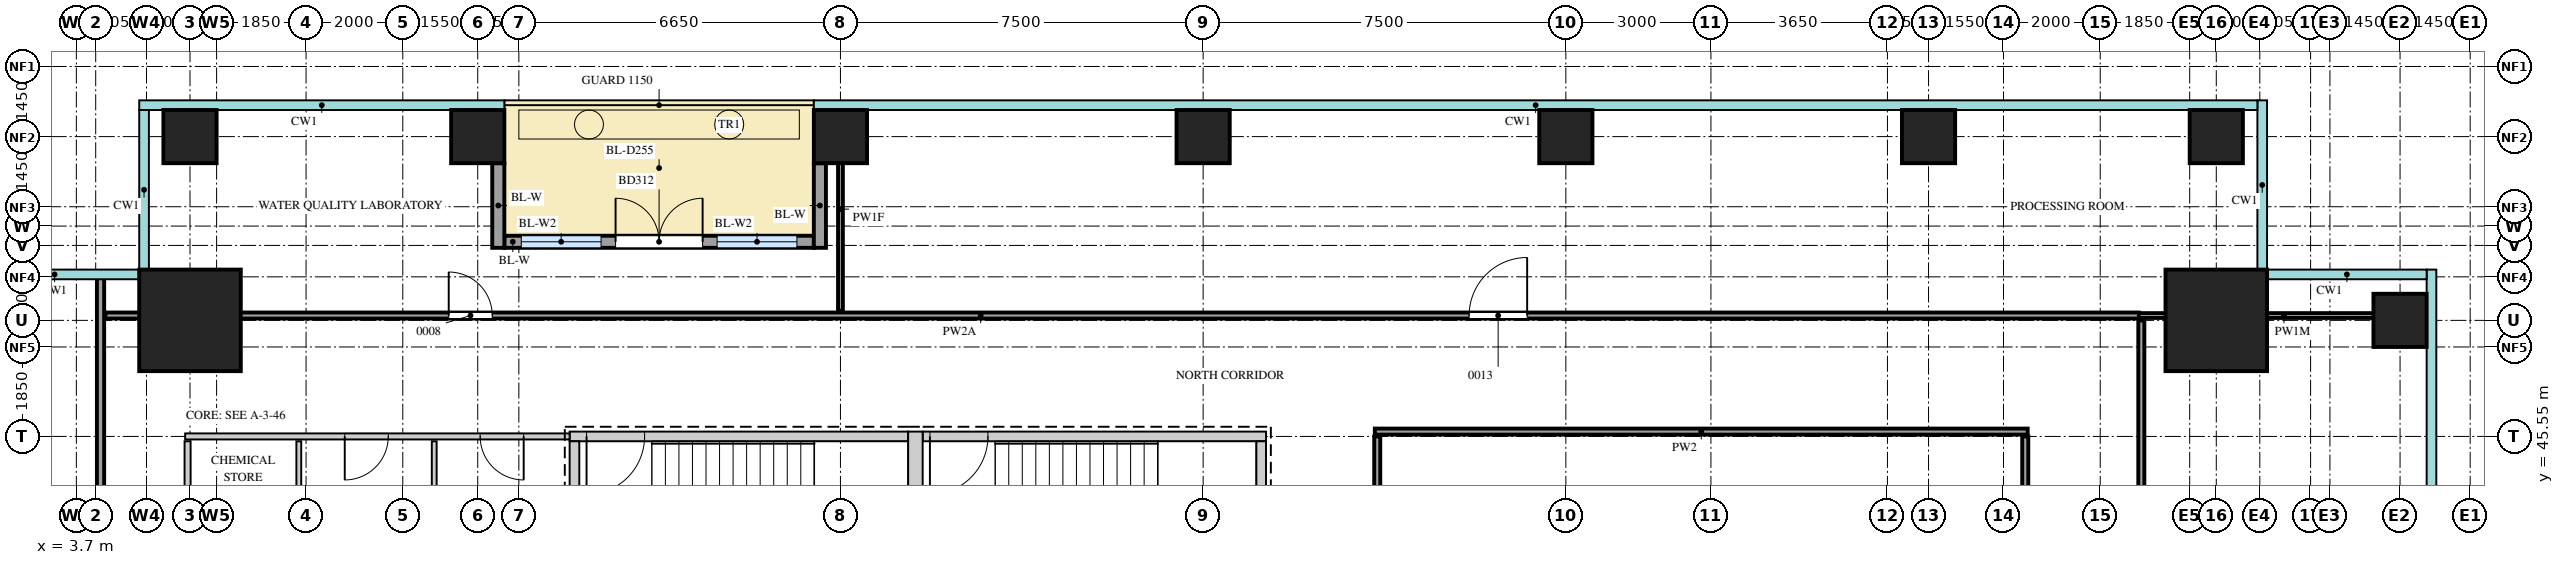
"""IFC4 building model, lengths in metres.
Left out: names, types, materials, properties, quantities, classifications, styles, units other than length and angle.
Written with IfcOpenShell. Run it as: python <this file> out.ifc"""

import sys

from ifc_helpers import new_model, si_unit, direction, frame, frame_2d, origin, origin_2d, place, context, subcontext, project, spatial, rectangle, extrude, source, transform, mapped, element, fill, save


model = new_model("IFC4")
c1 = context("Model", 3, precision=1e-05, world=origin(), true_north=direction((0.0, 1.0)))
c2 = subcontext(c1, "Body", "Model", "MODEL_VIEW")
j1 = project(units=[si_unit("LENGTHUNIT", "METRE"), si_unit("PLANEANGLEUNIT", "RADIAN")], contexts=[c1])
p1 = place(None, origin())
s1 = spatial("IfcSite", under=j1, at=p1, CompositionType="ELEMENT")
p2 = place(p1, origin())
s2 = spatial("IfcBuilding", under=s1, at=p2, CompositionType="ELEMENT")
p3 = place(p2, frame((0.0, 0.0, 145.5)))
s3 = spatial("IfcBuildingStorey", under=s2, at=p3, CompositionType="ELEMENT", Elevation=145.5)
m1 = source(origin(), c2, "Body", "SweptSolid", [
    extrude(rectangle(XDim=7.0, YDim=0.2, at=frame_2d((3.5, 0.0))), origin(), (0.0, 0.0, 1.0), 4.1),
])
p4 = place(p3, frame((13.9, 45.55, 0.0), z_axis=(0.0, 0.0, 1.0), x_axis=(1.0, 0.0, 0.0)))
e1 = element("IfcWall", 1, at=p4, inside=s3, PredefinedType="SHEAR", context=c2, shape_type="MappedRepresentation", body=[
    mapped(m1, transform((0.0, 0.0, 0.0))),
])
m2 = source(origin(), c2, "Body", "SweptSolid", [
    extrude(rectangle(XDim=1.2, YDim=2.1, at=frame_2d((0.6, 1.05))), frame((0.0, 0.11, 0.0), z_axis=(0.0, -1.0, 0.0), x_axis=(1.0, 0.0, 0.0)), (0.0, 0.0, 1.0), 0.22),
])
p5 = place(p4, frame((0.35, 0.0, 0.0)))
e2 = element("IfcOpeningElement", 2, at=p5, cuts=e1, PredefinedType="OPENING", context=c2, shape_type="MappedRepresentation", body=[
    mapped(m2, transform((0.0, 0.0, 0.0))),
])
m3 = source(origin(), c2, "Body", "SweptSolid", [
    extrude(rectangle(XDim=7.1, YDim=0.2, at=frame_2d((3.55, 0.0))), origin(), (0.0, 0.0, 1.0), 4.1),
])
p6 = place(p3, frame((21.2, 45.55, 0.0), z_axis=(0.0, 0.0, 1.0), x_axis=(1.0, 0.0, 0.0)))
e3 = element("IfcWall", 3, at=p6, inside=s3, PredefinedType="SHEAR", context=c2, shape_type="MappedRepresentation", body=[
    mapped(m3, transform((0.0, 0.0, 0.0))),
])
p7 = place(p6, frame((0.15, 0.0, 0.0)))
e4 = element("IfcOpeningElement", 4, at=p7, cuts=e3, PredefinedType="OPENING", context=c2, shape_type="MappedRepresentation", body=[
    mapped(m2, transform((0.0, 0.0, 0.0))),
])
m4 = source(origin(), c2, "Body", "SweptSolid", [
    extrude(rectangle(XDim=3.75, YDim=0.3, at=frame_2d((1.875, 0.0))), origin(), (0.0, 0.0, 1.0), 4.1),
])
p8 = place(p3, frame((21.05, 41.9, 0.0), z_axis=(0.0, 0.0, 1.0), x_axis=(0.0, 1.0, 0.0)))
e5 = element("IfcWall", 5, at=p8, inside=s3, PredefinedType="SHEAR", context=c2, shape_type="MappedRepresentation", body=[
    mapped(m4, transform((0.0, 0.0, 0.0))),
])
m5 = source(origin(), c2, "Body", "SweptSolid", [
    extrude(rectangle(XDim=3.35, YDim=0.2, at=frame_2d((1.675, 0.0))), origin(), (0.0, 0.0, 1.0), 4.1),
])
for number, where, z_axis, x_axis in (
    (6, (14.0, 42.1, 0.0), (0.0, 0.0, 1.0), (0.0, 1.0, 0.0)),
    (7, (28.2, 42.1, 0.0), (0.0, 0.0, 1.0), (0.0, 1.0, 0.0)),
):
    element("IfcWall", number, at=place(p3, frame(where, z_axis=z_axis, x_axis=x_axis)), inside=s3, PredefinedType="SHEAR", context=c2, shape_type="MappedRepresentation", body=[
        mapped(m5, transform((0.0, 0.0, 0.0))),
    ])
m6 = source(origin(), c2, "Body", "SweptSolid", [
    extrude(rectangle(XDim=2.1, YDim=2.1, at=origin_2d()), origin(), (0.0, 0.0, 1.0), 4.4),
])
for number, where, z_axis, x_axis in (
    (8, (47.95, 47.95, 0.0), (0.0, 0.0, 1.0), (1.0, 0.0, 0.0)),
    (9, (6.05, 47.95, 0.0), (0.0, 0.0, 1.0), (1.0, 0.0, 0.0)),
):
    element("IfcColumn", number, at=place(p3, frame(where, z_axis=z_axis, x_axis=x_axis)), inside=s3, PredefinedType="COLUMN", context=c2, shape_type="MappedRepresentation", body=[
        mapped(m6, transform((0.0, 0.0, 0.0))),
    ])
m7 = source(origin(), c2, "Body", "SweptSolid", [
    extrude(rectangle(XDim=1.1, YDim=1.1, at=origin_2d()), origin(), (0.0, 0.0, 1.0), 4.1),
])
for number, where, z_axis, x_axis in (
    (10, (51.75, 47.95, 0.0), (0.0, 0.0, 1.0), (1.0, 0.0, 0.0)),
    (11, (6.05, 51.75, 0.0), (0.0, 0.0, 1.0), (1.0, 0.0, 0.0)),
    (12, (12.0, 51.75, 0.0), (0.0, 0.0, 1.0), (1.0, 0.0, 0.0)),
    (13, (19.5, 51.75, 0.0), (0.0, 0.0, 1.0), (1.0, 0.0, 0.0)),
    (14, (27.0, 51.75, 0.0), (0.0, 0.0, 1.0), (1.0, 0.0, 0.0)),
    (15, (34.5, 51.75, 0.0), (0.0, 0.0, 1.0), (1.0, 0.0, 0.0)),
    (16, (42.0, 51.75, 0.0), (0.0, 0.0, 1.0), (1.0, 0.0, 0.0)),
    (17, (47.95, 51.75, 0.0), (0.0, 0.0, 1.0), (1.0, 0.0, 0.0)),
):
    element("IfcColumn", number, at=place(p3, frame(where, z_axis=z_axis, x_axis=x_axis)), inside=s3, PredefinedType="COLUMN", context=c2, shape_type="MappedRepresentation", body=[
        mapped(m7, transform((0.0, 0.0, 0.0))),
    ])
m8 = source(origin(), c2, "Body", "SweptSolid", [
    extrude(rectangle(XDim=6.4, YDim=0.25, at=frame_2d((3.2, 0.0))), origin(), (0.0, 0.0, 1.0), 4.1),
])
p9 = place(p3, frame((12.55, 49.575, 0.0), z_axis=(0.0, 0.0, 1.0), x_axis=(1.0, 0.0, 0.0)))
e18 = element("IfcWall", 18, at=p9, inside=s3, PredefinedType="SOLIDWALL", context=c2, shape_type="MappedRepresentation", body=[
    mapped(m8, transform((0.0, 0.0, 0.0))),
])
m9 = source(origin(), c2, "Body", "SweptSolid", [
    extrude(rectangle(XDim=1.65, YDim=2.4, at=frame_2d((0.825, 1.2))), frame((0.0, 0.135, 0.0), z_axis=(0.0, -1.0, 0.0), x_axis=(1.0, 0.0, 0.0)), (0.0, 0.0, 1.0), 0.27),
])
p10 = place(p9, frame((0.35, 0.0, 0.0)))
e19 = element("IfcOpeningElement", 19, at=p10, cuts=e18, PredefinedType="OPENING", context=c2, shape_type="MappedRepresentation", body=[
    mapped(m9, transform((0.0, 0.0, 0.0))),
])
p11 = place(p9, frame((4.4, 0.0, 0.0)))
e20 = element("IfcOpeningElement", 20, at=p11, cuts=e18, PredefinedType="OPENING", context=c2, shape_type="MappedRepresentation", body=[
    mapped(m9, transform((0.0, 0.0, 0.0))),
])
m10 = source(origin(), c2, "Body", "SweptSolid", [
    extrude(rectangle(XDim=1.8, YDim=2.4, at=frame_2d((0.9, 1.2))), frame((0.0, 0.135, 0.0), z_axis=(0.0, -1.0, 0.0), x_axis=(1.0, 0.0, 0.0)), (0.0, 0.0, 1.0), 0.27),
])
p12 = place(p9, frame((2.3, 0.0, 0.0)))
e21 = element("IfcOpeningElement", 21, at=p12, cuts=e18, PredefinedType="OPENING", context=c2, shape_type="MappedRepresentation", body=[
    mapped(m10, transform((0.0, 0.0, 0.0))),
])
m11 = source(origin(), c2, "Body", "SweptSolid", [
    extrude(rectangle(XDim=1.75, YDim=0.25, at=frame_2d((0.875, 0.0))), origin(), (0.0, 0.0, 1.0), 4.1),
])
for number, where, z_axis, x_axis in (
    (22, (12.425, 51.2, 0.0), (0.0, 0.0, 1.0), (0.0, -1.0, 0.0)),
    (23, (19.075, 51.2, 0.0), (0.0, 0.0, 1.0), (0.0, -1.0, 0.0)),
):
    element("IfcWall", number, at=place(p3, frame(where, z_axis=z_axis, x_axis=x_axis)), inside=s3, PredefinedType="SOLIDWALL", context=c2, shape_type="MappedRepresentation", body=[
        mapped(m11, transform((0.0, 0.0, 0.0))),
    ])
m12 = source(origin(), c2, "Body", "SweptSolid", [
    extrude(rectangle(XDim=43.7, YDim=0.15, at=frame_2d((21.85, 0.0))), origin(), (0.0, 0.0, 1.0), 4.2),
])
p13 = place(p3, frame((4.2, 5.15, 0.0), z_axis=(0.0, 0.0, 1.0), x_axis=(0.0, 1.0, 0.0)))
e24 = element("IfcWall", 24, at=p13, inside=s3, PredefinedType="PARTITIONING", context=c2, shape_type="MappedRepresentation", body=[
    mapped(m12, transform((0.0, 0.0, 0.0))),
])
m13 = source(origin(), c2, "Body", "SweptSolid", [
    extrude(rectangle(XDim=0.9, YDim=2.1, at=frame_2d((0.45, 1.05))), frame((0.0, 0.085, 0.0), z_axis=(0.0, -1.0, 0.0), x_axis=(1.0, 0.0, 0.0)), (0.0, 0.0, 1.0), 0.17),
])
p14 = place(p13, frame((20.1, 0.0, 0.0)))
e25 = element("IfcOpeningElement", 25, at=p14, cuts=e24, PredefinedType="OPENING", context=c2, shape_type="MappedRepresentation", body=[
    mapped(m13, transform((0.0, 0.0, 0.0))),
])
m14 = source(origin(), c2, "Body", "SweptSolid", [
    extrude(rectangle(XDim=32.85, YDim=0.125, at=frame_2d((16.425, 0.0))), origin(), (0.0, 0.0, 1.0), 4.2),
])
p15 = place(p3, frame((44.0, 12.7, 0.0), z_axis=(0.0, 0.0, 1.0), x_axis=(0.0, 1.0, 0.0)))
e26 = element("IfcWall", 26, at=p15, inside=s3, PredefinedType="PARTITIONING", context=c2, shape_type="MappedRepresentation", body=[
    mapped(m14, transform((0.0, 0.0, 0.0))),
])
m15 = source(origin(), c2, "Body", "SweptSolid", [
    extrude(rectangle(XDim=1.2, YDim=2.1, at=frame_2d((0.6, 1.05))), frame((0.0, 0.073, 0.0), z_axis=(0.0, -1.0, 0.0), x_axis=(1.0, 0.0, 0.0)), (0.0, 0.0, 1.0), 0.145),
])
p16 = place(p15, frame((13.7, 0.0, 0.0)))
e27 = element("IfcOpeningElement", 27, at=p16, cuts=e26, PredefinedType="OPENING", context=c2, shape_type="MappedRepresentation", body=[
    mapped(m15, transform((0.0, 0.0, 0.0))),
])
p17 = place(p15, frame((27.5, 0.0, 0.0)))
e28 = element("IfcOpeningElement", 28, at=p17, cuts=e26, PredefinedType="OPENING", context=c2, shape_type="MappedRepresentation", body=[
    mapped(m15, transform((0.0, 0.0, 0.0))),
])
m16 = source(origin(), c2, "Body", "SweptSolid", [
    extrude(rectangle(XDim=13.35, YDim=0.125, at=frame_2d((6.675, 0.0))), origin(), (0.0, 0.0, 1.0), 4.2),
])
p18 = place(p3, frame((46.4, 34.6, 0.0), z_axis=(0.0, 0.0, 1.0), x_axis=(0.0, 1.0, 0.0)))
e29 = element("IfcWall", 29, at=p18, inside=s3, PredefinedType="PARTITIONING", context=c2, shape_type="MappedRepresentation", body=[
    mapped(m16, transform((0.0, 0.0, 0.0))),
])
p19 = place(p18, frame((4.9, 0.0, 0.0)))
e30 = element("IfcOpeningElement", 30, at=p19, cuts=e29, PredefinedType="OPENING", context=c2, shape_type="MappedRepresentation", body=[
    mapped(m15, transform((0.0, 0.0, 0.0))),
])
m17 = source(origin(), c2, "Body", "SweptSolid", [
    extrude(rectangle(XDim=9.45, YDim=0.125, at=frame_2d((4.725, 0.0))), origin(), (0.0, 0.0, 1.0), 4.2),
])
p20 = place(p3, frame((30.6, 36.1, 0.0), z_axis=(0.0, 0.0, 1.0), x_axis=(0.0, 1.0, 0.0)))
e31 = element("IfcWall", 31, at=p20, inside=s3, PredefinedType="PARTITIONING", context=c2, shape_type="MappedRepresentation", body=[
    mapped(m17, transform((0.0, 0.0, 0.0))),
])
m18 = source(origin(), c2, "Body", "SweptSolid", [
    extrude(rectangle(XDim=3.45, YDim=0.125, at=frame_2d((1.725, 0.0))), origin(), (0.0, 0.0, 1.0), 4.2),
])
p21 = place(p3, frame((6.0, 42.0, 0.0), z_axis=(0.0, 0.0, 1.0), x_axis=(0.0, 1.0, 0.0)))
e32 = element("IfcWall", 32, at=p21, inside=s3, PredefinedType="PARTITIONING", context=c2, shape_type="MappedRepresentation", body=[
    mapped(m18, transform((0.0, 0.0, 0.0))),
])
m19 = source(origin(), c2, "Body", "SweptSolid", [
    extrude(rectangle(XDim=0.9, YDim=2.1, at=frame_2d((0.45, 1.05))), frame((0.0, 0.073, 0.0), z_axis=(0.0, -1.0, 0.0), x_axis=(1.0, 0.0, 0.0)), (0.0, 0.0, 1.0), 0.145),
])
p22 = place(p21, frame((1.2, 0.0, 0.0)))
e33 = element("IfcOpeningElement", 33, at=p22, cuts=e32, PredefinedType="OPENING", context=c2, shape_type="MappedRepresentation", body=[
    mapped(m19, transform((0.0, 0.0, 0.0))),
])
m20 = source(origin(), c2, "Body", "SweptSolid", [
    extrude(rectangle(XDim=3.45, YDim=0.1, at=frame_2d((1.725, 0.0))), origin(), (0.0, 0.0, 1.0), 4.2),
])
for number, where, z_axis, x_axis in (
    (34, (8.3, 42.0, 0.0), (0.0, 0.0, 1.0), (0.0, 1.0, 0.0)),
    (35, (11.1, 42.0, 0.0), (0.0, 0.0, 1.0), (0.0, 1.0, 0.0)),
):
    element("IfcWall", number, at=place(p3, frame(where, z_axis=z_axis, x_axis=x_axis)), inside=s3, PredefinedType="PARTITIONING", context=c2, shape_type="MappedRepresentation", body=[
        mapped(m20, transform((0.0, 0.0, 0.0))),
    ])
m21 = source(origin(), c2, "Body", "SweptSolid", [
    extrude(rectangle(XDim=7.95, YDim=0.125, at=frame_2d((3.975, 0.0))), origin(), (0.0, 0.0, 1.0), 4.2),
])
p23 = place(p3, frame((5.95, 45.55, 0.0), z_axis=(0.0, 0.0, 1.0), x_axis=(1.0, 0.0, 0.0)))
e36 = element("IfcWall", 36, at=p23, inside=s3, PredefinedType="PARTITIONING", context=c2, shape_type="MappedRepresentation", body=[
    mapped(m21, transform((0.0, 0.0, 0.0))),
])
p24 = place(p23, frame((3.3, 0.0, 0.0)))
e37 = element("IfcOpeningElement", 37, at=p24, cuts=e36, PredefinedType="OPENING", context=c2, shape_type="MappedRepresentation", body=[
    mapped(m19, transform((0.0, 0.0, 0.0))),
])
p25 = place(p23, frame((6.1, 0.0, 0.0)))
e38 = element("IfcOpeningElement", 38, at=p25, cuts=e36, PredefinedType="OPENING", context=c2, shape_type="MappedRepresentation", body=[
    mapped(m19, transform((0.0, 0.0, 0.0))),
])
m22 = source(origin(), c2, "Body", "SweptSolid", [
    extrude(rectangle(XDim=13.5, YDim=0.125, at=frame_2d((6.75, 0.0))), origin(), (0.0, 0.0, 1.0), 4.2),
])
p26 = place(p3, frame((30.55, 45.65, 0.0), z_axis=(0.0, 0.0, 1.0), x_axis=(1.0, 0.0, 0.0)))
e39 = element("IfcWall", 39, at=p26, inside=s3, PredefinedType="PARTITIONING", context=c2, shape_type="MappedRepresentation", body=[
    mapped(m22, transform((0.0, 0.0, 0.0))),
])
m23 = source(origin(), c2, "Body", "SweptSolid", [
    extrude(rectangle(XDim=42.05, YDim=0.125, at=frame_2d((21.025, 0.0))), origin(), (0.0, 0.0, 1.0), 3.55),
])
p27 = place(p3, frame((4.3, 48.05, 0.0), z_axis=(0.0, 0.0, 1.0), x_axis=(1.0, 0.0, 0.0)))
e40 = element("IfcWall", 40, at=p27, inside=s3, PredefinedType="PARTITIONING", context=c2, shape_type="MappedRepresentation", body=[
    mapped(m23, transform((0.0, 0.0, 0.0))),
])
p28 = place(p27, frame((7.1, 0.0, 0.0)))
e41 = element("IfcOpeningElement", 41, at=p28, cuts=e40, PredefinedType="OPENING", context=c2, shape_type="MappedRepresentation", body=[
    mapped(m19, transform((0.0, 0.0, 0.0))),
])
p29 = place(p27, frame((28.2, 0.0, 0.0)))
e42 = element("IfcOpeningElement", 42, at=p29, cuts=e40, PredefinedType="OPENING", context=c2, shape_type="MappedRepresentation", body=[
    mapped(m15, transform((0.0, 0.0, 0.0))),
])
m24 = source(origin(), c2, "Body", "SweptSolid", [
    extrude(rectangle(XDim=6.0, YDim=0.1, at=frame_2d((3.0, 0.0))), origin(), (0.0, 0.0, 1.0), 3.55),
])
p30 = place(p3, frame((46.35, 48.05, 0.0), z_axis=(0.0, 0.0, 1.0), x_axis=(1.0, 0.0, 0.0)))
e43 = element("IfcWall", 43, at=p30, inside=s3, PredefinedType="PARTITIONING", context=c2, shape_type="MappedRepresentation", body=[
    mapped(m24, transform((0.0, 0.0, 0.0))),
])
m25 = source(origin(), c2, "Body", "SweptSolid", [
    extrude(rectangle(XDim=4.2, YDim=0.1, at=frame_2d((2.1, 0.0))), origin(), (0.0, 0.0, 1.0), 3.77),
])
p31 = place(p3, frame((19.5, 48.15, 0.0), z_axis=(0.0, 0.0, 1.0), x_axis=(0.0, 1.0, 0.0)))
e44 = element("IfcWall", 44, at=p31, inside=s3, PredefinedType="PARTITIONING", context=c2, shape_type="MappedRepresentation", body=[
    mapped(m25, transform((0.0, 0.0, 0.0))),
])
m26 = source(origin(), c2, "Body", "SweptSolid", [
    extrude(rectangle(XDim=1.65, YDim=2.4, at=frame_2d((0.825, 1.2))), frame((0.0, 0.03, 0.0), z_axis=(0.0, -1.0, 0.0), x_axis=(1.0, 0.0, 0.0)), (0.0, 0.0, 1.0), 0.06),
])
p32 = place(p10, origin())
e45 = element("IfcWindow", 45, at=p32, inside=s3, PartitioningType="SINGLE_PANEL", PredefinedType="WINDOW", context=c2, shape_type="MappedRepresentation", body=[
    mapped(m26, transform((0.0, 0.0, 0.0))),
])
fill(e19, e45)
p33 = place(p11, origin())
e46 = element("IfcWindow", 46, at=p33, inside=s3, PartitioningType="SINGLE_PANEL", PredefinedType="WINDOW", context=c2, shape_type="MappedRepresentation", body=[
    mapped(m26, transform((0.0, 0.0, 0.0))),
])
fill(e20, e46)
m27 = source(origin(), c2, "Body", "SweptSolid", [
    extrude(rectangle(XDim=1.8, YDim=2.4, at=frame_2d((0.9, 1.2))), frame((0.0, 0.025, 0.0), z_axis=(0.0, -1.0, 0.0), x_axis=(1.0, 0.0, 0.0)), (0.0, 0.0, 1.0), 0.05),
])
p34 = place(p12, origin())
e47 = element("IfcDoor", 47, at=p34, inside=s3, OperationType="DOUBLE_DOOR_DOUBLE_SWING", PredefinedType="DOOR", context=c2, shape_type="MappedRepresentation", body=[
    mapped(m27, transform((0.0, 0.0, 0.0))),
])
fill(e21, e47)
m28 = source(origin(), c2, "Body", "SweptSolid", [
    extrude(rectangle(XDim=0.9, YDim=2.1, at=frame_2d((0.45, 1.05))), frame((0.0, 0.025, 0.0), z_axis=(0.0, -1.0, 0.0), x_axis=(1.0, 0.0, 0.0)), (0.0, 0.0, 1.0), 0.05),
])
p35 = place(p28, origin())
e48 = element("IfcDoor", 48, at=p35, inside=s3, OperationType="SINGLE_SWING_RIGHT", PredefinedType="DOOR", context=c2, shape_type="MappedRepresentation", body=[
    mapped(m28, transform((0.0, 0.0, 0.0))),
])
fill(e41, e48)
m29 = source(origin(), c2, "Body", "SweptSolid", [
    extrude(rectangle(XDim=1.2, YDim=2.1, at=frame_2d((0.6, 1.05))), frame((0.0, 0.025, 0.0), z_axis=(0.0, -1.0, 0.0), x_axis=(1.0, 0.0, 0.0)), (0.0, 0.0, 1.0), 0.05),
])
p36 = place(p29, origin())
e49 = element("IfcDoor", 49, at=p36, inside=s3, OperationType="SINGLE_SWING_LEFT", PredefinedType="DOOR", context=c2, shape_type="MappedRepresentation", body=[
    mapped(m29, transform((0.0, 0.0, 0.0))),
])
fill(e42, e49)
p37 = place(p24, origin())
e50 = element("IfcDoor", 50, at=p37, inside=s3, OperationType="SINGLE_SWING_LEFT", PredefinedType="DOOR", context=c2, shape_type="MappedRepresentation", body=[
    mapped(m28, transform((0.0, 0.0, 0.0))),
])
fill(e37, e50)
p38 = place(p25, origin())
e51 = element("IfcDoor", 51, at=p38, inside=s3, OperationType="SINGLE_SWING_RIGHT", PredefinedType="DOOR", context=c2, shape_type="MappedRepresentation", body=[
    mapped(m28, transform((0.0, 0.0, 0.0))),
])
fill(e38, e51)
p39 = place(p5, origin())
e52 = element("IfcDoor", 52, at=p39, inside=s3, OperationType="SINGLE_SWING_LEFT", PredefinedType="DOOR", context=c2, shape_type="MappedRepresentation", body=[
    mapped(m29, transform((0.0, 0.0, 0.0))),
])
fill(e2, e52)
p40 = place(p7, origin())
e53 = element("IfcDoor", 53, at=p40, inside=s3, OperationType="SINGLE_SWING_LEFT", PredefinedType="DOOR", context=c2, shape_type="MappedRepresentation", body=[
    mapped(m29, transform((0.0, 0.0, 0.0))),
])
fill(e4, e53)
save(model, sys.argv[1])
